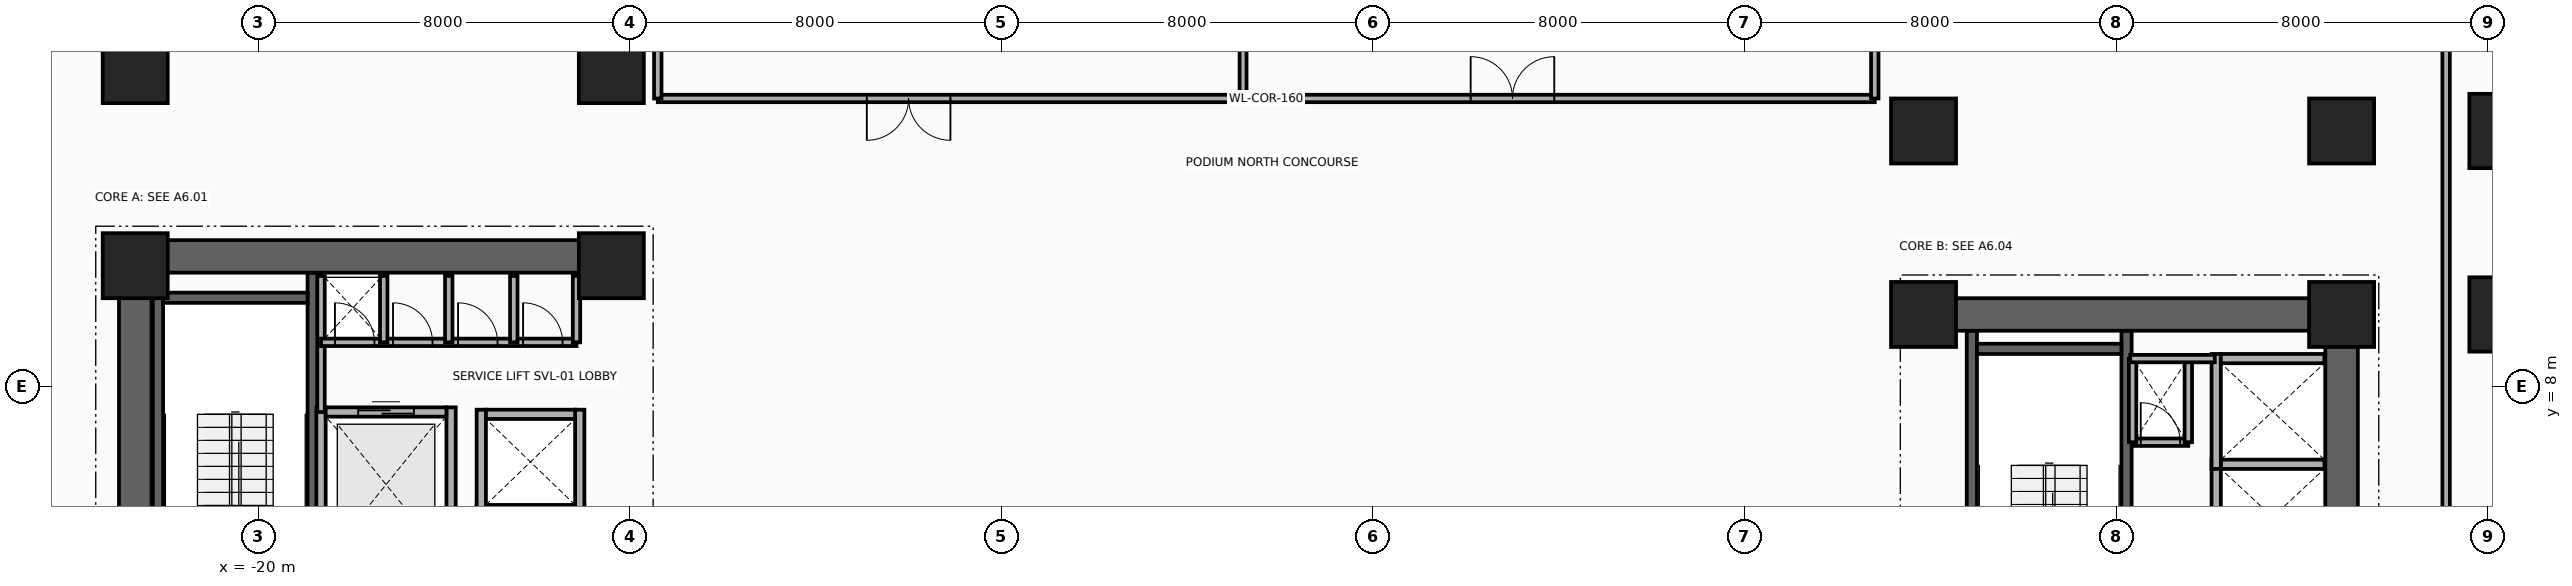
"""IFC4 building model, lengths in metres.
Left out: names, types, materials, properties, quantities, classifications, styles, units other than length and angle.
Written with IfcOpenShell. Run it as: python <this file> out.ifc"""

import sys

from ifc_helpers import new_model, si_unit, direction, frame, frame_2d, origin, origin_2d, place, context, subcontext, project, spatial, rectangle, extrude, source, transform, mapped, element, fill, save


model = new_model("IFC4")
c1 = context("Model", 3, precision=1e-05, world=origin(), true_north=direction((0.0, 1.0)))
c2 = subcontext(c1, "Body", "Model", "MODEL_VIEW")
j1 = project(units=[si_unit("LENGTHUNIT", "METRE"), si_unit("PLANEANGLEUNIT", "RADIAN")], contexts=[c1])
p1 = place(None, origin())
s1 = spatial("IfcSite", under=j1, at=p1, CompositionType="ELEMENT")
p2 = place(p1, origin())
s2 = spatial("IfcBuilding", under=s1, at=p2, CompositionType="ELEMENT")
p3 = place(p2, frame((0.0, 0.0, 15.6)))
s3 = spatial("IfcBuildingStorey", under=s2, at=p3, CompositionType="ELEMENT", Elevation=15.6)
for number, where, z_axis, x_axis in (
    (1, (-22.16, 1.78, 0.0), (0.0, 0.0, 1.0), (0.0, 1.0, 0.0)),
    (2, (-18.83, 1.78, 0.0), (0.0, 0.0, 1.0), (0.0, 1.0, 0.0)),
):
    element("IfcWall", number, at=place(p3, frame(where, z_axis=z_axis, x_axis=x_axis)), inside=s3, PredefinedType="SHEAR", context=c2, shape_type="SweptSolid", body=[
        extrude(rectangle(XDim=8.67, YDim=0.22, at=frame_2d((4.335, 0.0))), origin(), (0.0, 0.0, 1.0), 4.8),
    ])
p4 = place(p3, frame((-22.05, 9.91, 0.0), z_axis=(0.0, 0.0, 1.0), x_axis=(1.0, 0.0, 0.0)))
e3 = element("IfcWall", 3, at=p4, inside=s3, PredefinedType="SHEAR", context=c2, shape_type="SweptSolid", body=[
    extrude(rectangle(XDim=3.11, YDim=0.22, at=frame_2d((1.555, 0.0))), origin(), (0.0, 0.0, 1.0), 4.8),
])
for number, where, z_axis, x_axis in (
    (4, (16.89, 0.68, 0.0), (0.0, 0.0, 1.0), (0.0, 1.0, 0.0)),
    (5, (20.22, 0.68, 0.0), (0.0, 0.0, 1.0), (0.0, 1.0, 0.0)),
):
    element("IfcWall", number, at=place(p3, frame(where, z_axis=z_axis, x_axis=x_axis)), inside=s3, PredefinedType="SHEAR", context=c2, shape_type="SweptSolid", body=[
        extrude(rectangle(XDim=8.52, YDim=0.22, at=frame_2d((4.26, 0.0))), origin(), (0.0, 0.0, 1.0), 4.8),
    ])
p5 = place(p3, frame((17.0, 8.81, 0.0), z_axis=(0.0, 0.0, 1.0), x_axis=(1.0, 0.0, 0.0)))
e6 = element("IfcWall", 6, at=p5, inside=s3, PredefinedType="SHEAR", context=c2, shape_type="SweptSolid", body=[
    extrude(rectangle(XDim=3.11, YDim=0.22, at=frame_2d((1.555, 0.0))), origin(), (0.0, 0.0, 1.0), 4.8),
])
p6 = place(p3, frame((-22.65, -11.15, 0.0), z_axis=(0.0, 0.0, 1.0), x_axis=(0.0, 1.0, 0.0)))
e7 = element("IfcWall", 7, at=p6, inside=s3, PredefinedType="SHEAR", context=c2, shape_type="SweptSolid", body=[
    extrude(rectangle(XDim=22.3, YDim=0.7, at=frame_2d((11.15, 0.0))), origin(), (0.0, 0.0, 1.0), 4.8),
])
p7 = place(p3, frame((-22.65, 10.8, 0.0), z_axis=(0.0, 0.0, 1.0), x_axis=(1.0, 0.0, 0.0)))
e8 = element("IfcWall", 8, at=p7, inside=s3, PredefinedType="SHEAR", context=c2, shape_type="SweptSolid", body=[
    extrude(rectangle(XDim=10.25, YDim=0.7, at=frame_2d((5.125, 0.0))), origin(), (0.0, 0.0, 1.0), 4.8),
])
p8 = place(p3, frame((24.85, 0.95, 0.0), z_axis=(0.0, 0.0, 1.0), x_axis=(0.0, 1.0, 0.0)))
e9 = element("IfcWall", 9, at=p8, inside=s3, PredefinedType="SHEAR", context=c2, shape_type="SweptSolid", body=[
    extrude(rectangle(XDim=8.95, YDim=0.7, at=frame_2d((4.475, 0.0))), origin(), (0.0, 0.0, 1.0), 4.8),
])
p9 = place(p3, frame((15.85, 9.55, 0.0), z_axis=(0.0, 0.0, 1.0), x_axis=(1.0, 0.0, 0.0)))
e10 = element("IfcWall", 10, at=p9, inside=s3, PredefinedType="SHEAR", context=c2, shape_type="SweptSolid", body=[
    extrude(rectangle(XDim=9.0, YDim=0.7, at=frame_2d((4.5, 0.0))), origin(), (0.0, 0.0, 1.0), 4.8),
])
m1 = source(origin(), c2, "Body", "SweptSolid", [
    extrude(rectangle(XDim=1.4, YDim=1.4, at=origin_2d()), origin(), (0.0, 0.0, 1.0), 5.2),
])
for number, where, z_axis, x_axis in (
    (11, (-22.65, 10.6, 0.0), (0.0, 0.0, 1.0), (1.0, 0.0, 0.0)),
    (12, (-12.4, 10.6, 0.0), (0.0, 0.0, 1.0), (1.0, 0.0, 0.0)),
    (13, (-22.65, 14.8, 0.0), (0.0, 0.0, 1.0), (1.0, 0.0, 0.0)),
    (14, (-12.4, 14.8, 0.0), (0.0, 0.0, 1.0), (1.0, 0.0, 0.0)),
    (15, (15.85, 9.55, 0.0), (0.0, 0.0, 1.0), (1.0, 0.0, 0.0)),
    (16, (24.85, 9.55, 0.0), (0.0, 0.0, 1.0), (1.0, 0.0, 0.0)),
):
    element("IfcColumn", number, at=place(p3, frame(where, z_axis=z_axis, x_axis=x_axis)), inside=s3, PredefinedType="COLUMN", context=c2, shape_type="MappedRepresentation", body=[
        mapped(m1, transform((0.0, 0.0, 0.0), x_axis=(1.0, 0.0, 0.0), y_axis=(0.0, 1.0, 0.0), z_axis=(0.0, 0.0, 1.0), scale=1.0)),
    ])
m2 = source(origin(), c2, "Body", "SweptSolid", [
    extrude(rectangle(XDim=1.6, YDim=1.6, at=origin_2d()), origin(), (0.0, 0.0, 1.0), 5.2),
])
p10 = place(p3, frame((28.4, 9.55, 0.0), z_axis=(0.0, 0.0, 1.0), x_axis=(1.0, 0.0, 0.0)))
e17 = element("IfcColumn", 17, at=p10, inside=s3, PredefinedType="COLUMN", context=c2, shape_type="MappedRepresentation", body=[
    mapped(m2, transform((0.0, 0.0, 0.0), x_axis=(1.0, 0.0, 0.0), y_axis=(0.0, 1.0, 0.0), z_axis=(0.0, 0.0, 1.0), scale=1.0)),
])
for number, where, z_axis, x_axis in (
    (18, (15.85, 13.5, 0.0), (0.0, 0.0, 1.0), (1.0, 0.0, 0.0)),
    (19, (24.85, 13.5, 0.0), (0.0, 0.0, 1.0), (1.0, 0.0, 0.0)),
):
    element("IfcColumn", number, at=place(p3, frame(where, z_axis=z_axis, x_axis=x_axis)), inside=s3, PredefinedType="COLUMN", context=c2, shape_type="MappedRepresentation", body=[
        mapped(m1, transform((0.0, 0.0, 0.0), x_axis=(1.0, 0.0, 0.0), y_axis=(0.0, 1.0, 0.0), z_axis=(0.0, 0.0, 1.0), scale=1.0)),
    ])
p11 = place(p3, frame((28.4, 13.5, 0.0), z_axis=(0.0, 0.0, 1.0), x_axis=(1.0, 0.0, 0.0)))
e20 = element("IfcColumn", 20, at=p11, inside=s3, PredefinedType="COLUMN", context=c2, shape_type="MappedRepresentation", body=[
    mapped(m2, transform((0.0, 0.0, 0.0), x_axis=(1.0, 0.0, 0.0), y_axis=(0.0, 1.0, 0.0), z_axis=(0.0, 0.0, 1.0), scale=1.0)),
])
for number, where, z_axis, x_axis in (
    (21, (-18.65, 4.225, 0.0), (0.0, 0.0, 1.0), (0.0, 1.0, 0.0)),
    (22, (-15.85, 4.225, 0.0), (0.0, 0.0, 1.0), (0.0, 1.0, 0.0)),
):
    element("IfcWall", number, at=place(p3, frame(where, z_axis=z_axis, x_axis=x_axis)), inside=s3, PredefinedType="MOVABLE", context=c2, shape_type="SweptSolid", body=[
        extrude(rectangle(XDim=3.325, YDim=0.2, at=frame_2d((1.663, 0.0))), origin(), (0.0, 0.0, 1.0), 4.8),
    ])
p12 = place(p3, frame((-18.55, 7.45, 0.0), z_axis=(0.0, 0.0, 1.0), x_axis=(1.0, 0.0, 0.0)))
e23 = element("IfcWall", 23, at=p12, inside=s3, PredefinedType="MOVABLE", context=c2, shape_type="SweptSolid", body=[
    extrude(rectangle(XDim=2.6, YDim=0.2, at=frame_2d((1.3, 0.0))), origin(), (0.0, 0.0, 1.0), 4.8),
])
p13 = place(p12, frame((0.7, 0.0, 0.0)))
e24 = element("IfcOpeningElement", 24, at=p13, cuts=e23, PredefinedType="OPENING", context=c2, shape_type="SweptSolid", body=[
    extrude(rectangle(XDim=1.2, YDim=2.1, at=frame_2d((0.6, 1.05))), frame((0.0, 0.115, 0.0), z_axis=(0.0, -1.0, 0.0), x_axis=(1.0, 0.0, 0.0)), (0.0, 0.0, 1.0), 0.23),
])
p14 = place(p3, frame((22.15, 3.95, 0.0), z_axis=(0.0, 0.0, 1.0), x_axis=(0.0, 1.0, 0.0)))
e25 = element("IfcWall", 25, at=p14, inside=s3, PredefinedType="MOVABLE", context=c2, shape_type="SweptSolid", body=[
    extrude(rectangle(XDim=2.475, YDim=0.2, at=frame_2d((1.238, 0.0))), origin(), (0.0, 0.0, 1.0), 4.8),
])
p15 = place(p3, frame((22.25, 6.325, 0.0), z_axis=(0.0, 0.0, 1.0), x_axis=(1.0, 0.0, 0.0)))
e26 = element("IfcWall", 26, at=p15, inside=s3, PredefinedType="MOVABLE", context=c2, shape_type="SweptSolid", body=[
    extrude(rectangle(XDim=2.23, YDim=0.2, at=frame_2d((1.115, 0.0))), origin(), (0.0, 0.0, 1.0), 3.745),
])
p16 = place(p3, frame((22.15, 6.225, 0.0), z_axis=(0.0, 0.0, 1.0), x_axis=(0.0, 1.0, 0.0)))
e27 = element("IfcWall", 27, at=p16, inside=s3, PredefinedType="MOVABLE", context=c2, shape_type="SweptSolid", body=[
    extrude(rectangle(XDim=2.475, YDim=0.2, at=frame_2d((1.237, 0.0))), origin(), (0.0, 0.0, 1.0), 4.8),
])
p17 = place(p3, frame((22.25, 8.6, 0.0), z_axis=(0.0, 0.0, 1.0), x_axis=(1.0, 0.0, 0.0)))
e28 = element("IfcWall", 28, at=p17, inside=s3, PredefinedType="MOVABLE", context=c2, shape_type="SweptSolid", body=[
    extrude(rectangle(XDim=2.23, YDim=0.2, at=frame_2d((1.115, 0.0))), origin(), (0.0, 0.0, 1.0), 3.745),
])
for number, where, z_axis, x_axis in (
    (29, (-15.2, 3.2, 0.0), (0.0, 0.0, 1.0), (0.0, 1.0, 0.0)),
    (30, (-13.08, 3.2, 0.0), (0.0, 0.0, 1.0), (0.0, 1.0, 0.0)),
):
    element("IfcWall", number, at=place(p3, frame(where, z_axis=z_axis, x_axis=x_axis)), inside=s3, PredefinedType="MOVABLE", context=c2, shape_type="SweptSolid", body=[
        extrude(rectangle(XDim=2.25, YDim=0.2, at=frame_2d((1.125, 0.0))), origin(), (0.0, 0.0, 1.0), 4.8),
    ])
p18 = place(p3, frame((-15.1, 5.35, 0.0), z_axis=(0.0, 0.0, 1.0), x_axis=(1.0, 0.0, 0.0)))
e31 = element("IfcWall", 31, at=p18, inside=s3, PredefinedType="MOVABLE", context=c2, shape_type="SweptSolid", body=[
    extrude(rectangle(XDim=1.92, YDim=0.2, at=frame_2d((0.96, 0.0))), origin(), (0.0, 0.0, 1.0), 4.8),
])
for number, where, z_axis, x_axis in (
    (32, (-15.2, 5.25, 0.0), (0.0, 0.0, 1.0), (0.0, 1.0, 0.0)),
    (33, (-13.08, 5.25, 0.0), (0.0, 0.0, 1.0), (0.0, 1.0, 0.0)),
):
    element("IfcWall", number, at=place(p3, frame(where, z_axis=z_axis, x_axis=x_axis)), inside=s3, PredefinedType="MOVABLE", context=c2, shape_type="SweptSolid", body=[
        extrude(rectangle(XDim=2.25, YDim=0.2, at=frame_2d((1.125, 0.0))), origin(), (0.0, 0.0, 1.0), 4.8),
    ])
p19 = place(p3, frame((-15.1, 7.4, 0.0), z_axis=(0.0, 0.0, 1.0), x_axis=(1.0, 0.0, 0.0)))
e34 = element("IfcWall", 34, at=p19, inside=s3, PredefinedType="MOVABLE", context=c2, shape_type="SweptSolid", body=[
    extrude(rectangle(XDim=1.92, YDim=0.2, at=frame_2d((0.96, 0.0))), origin(), (0.0, 0.0, 1.0), 4.8),
])
p20 = place(p3, frame((-18.65, 7.45, 0.0), z_axis=(0.0, 0.0, 1.0), x_axis=(0.0, 1.0, 0.0)))
e35 = element("IfcWall", 35, at=p20, inside=s3, PredefinedType="PARTITIONING", context=c2, shape_type="SweptSolid", body=[
    extrude(rectangle(XDim=2.93, YDim=0.16, at=frame_2d((1.465, 0.0))), origin(), (0.0, 0.0, 1.0), 3.585),
])
p21 = place(p3, frame((-18.65, 8.95, 0.0), z_axis=(0.0, 0.0, 1.0), x_axis=(1.0, 0.0, 0.0)))
e36 = element("IfcWall", 36, at=p21, inside=s3, PredefinedType="PARTITIONING", context=c2, shape_type="SweptSolid", body=[
    extrude(rectangle(XDim=5.5, YDim=0.16, at=frame_2d((2.75, 0.0))), origin(), (0.0, 0.0, 1.0), 4.8),
])
p22 = place(p21, frame((0.3, 0.0, 0.0)))
e37 = element("IfcOpeningElement", 37, at=p22, cuts=e36, PredefinedType="OPENING", context=c2, shape_type="SweptSolid", body=[
    extrude(rectangle(XDim=0.85, YDim=2.05, at=frame_2d((0.425, 1.025))), frame((0.0, 0.095, 0.0), z_axis=(0.0, -1.0, 0.0), x_axis=(1.0, 0.0, 0.0)), (0.0, 0.0, 1.0), 0.19),
])
p23 = place(p21, frame((1.55, 0.0, 0.0)))
e38 = element("IfcOpeningElement", 38, at=p23, cuts=e36, PredefinedType="OPENING", context=c2, shape_type="SweptSolid", body=[
    extrude(rectangle(XDim=0.85, YDim=2.05, at=frame_2d((0.425, 1.025))), frame((0.0, 0.095, 0.0), z_axis=(0.0, -1.0, 0.0), x_axis=(1.0, 0.0, 0.0)), (0.0, 0.0, 1.0), 0.19),
])
p24 = place(p21, frame((2.95, 0.0, 0.0)))
e39 = element("IfcOpeningElement", 39, at=p24, cuts=e36, PredefinedType="OPENING", context=c2, shape_type="SweptSolid", body=[
    extrude(rectangle(XDim=0.85, YDim=2.05, at=frame_2d((0.425, 1.025))), frame((0.0, 0.095, 0.0), z_axis=(0.0, -1.0, 0.0), x_axis=(1.0, 0.0, 0.0)), (0.0, 0.0, 1.0), 0.19),
])
p25 = place(p21, frame((4.35, 0.0, 0.0)))
e40 = element("IfcOpeningElement", 40, at=p25, cuts=e36, PredefinedType="OPENING", context=c2, shape_type="SweptSolid", body=[
    extrude(rectangle(XDim=0.85, YDim=2.05, at=frame_2d((0.425, 1.025))), frame((0.0, 0.095, 0.0), z_axis=(0.0, -1.0, 0.0), x_axis=(1.0, 0.0, 0.0)), (0.0, 0.0, 1.0), 0.19),
])
for number, where, z_axis, x_axis in (
    (41, (-13.15, 8.95, 0.0), (0.0, 0.0, 1.0), (0.0, 1.0, 0.0)),
    (42, (-17.3, 8.95, 0.0), (0.0, 0.0, 1.0), (0.0, 1.0, 0.0)),
    (43, (-15.9, 8.95, 0.0), (0.0, 0.0, 1.0), (0.0, 1.0, 0.0)),
    (44, (-14.5, 8.95, 0.0), (0.0, 0.0, 1.0), (0.0, 1.0, 0.0)),
):
    element("IfcWall", number, at=place(p3, frame(where, z_axis=z_axis, x_axis=x_axis)), inside=s3, PredefinedType="PARTITIONING", context=c2, shape_type="SweptSolid", body=[
        extrude(rectangle(XDim=1.43, YDim=0.16, at=frame_2d((0.715, 0.0))), origin(), (0.0, 0.0, 1.0), 3.585),
    ])
p26 = place(p3, frame((20.35, 6.8, 0.0), z_axis=(0.0, 0.0, 1.0), x_axis=(1.0, 0.0, 0.0)))
e45 = element("IfcWall", 45, at=p26, inside=s3, PredefinedType="PARTITIONING", context=c2, shape_type="SweptSolid", body=[
    extrude(rectangle(XDim=1.2, YDim=0.16, at=frame_2d((0.6, 0.0))), origin(), (0.0, 0.0, 1.0), 4.8),
])
p27 = place(p26, frame((0.175, 0.0, 0.0)))
e46 = element("IfcOpeningElement", 46, at=p27, cuts=e45, PredefinedType="OPENING", context=c2, shape_type="SweptSolid", body=[
    extrude(rectangle(XDim=0.85, YDim=2.05, at=frame_2d((0.425, 1.025))), frame((0.0, 0.095, 0.0), z_axis=(0.0, -1.0, 0.0), x_axis=(1.0, 0.0, 0.0)), (0.0, 0.0, 1.0), 0.19),
])
for number, where, z_axis, x_axis in (
    (47, (21.55, 6.8, 0.0), (0.0, 0.0, 1.0), (0.0, 1.0, 0.0)),
    (48, (20.35, 6.8, 0.0), (0.0, 0.0, 1.0), (0.0, 1.0, 0.0)),
):
    element("IfcWall", number, at=place(p3, frame(where, z_axis=z_axis, x_axis=x_axis)), inside=s3, PredefinedType="PARTITIONING", context=c2, shape_type="SweptSolid", body=[
        extrude(rectangle(XDim=1.8, YDim=0.16, at=frame_2d((0.9, 0.0))), origin(), (0.0, 0.0, 1.0), 4.8),
    ])
p28 = place(p3, frame((20.3, 8.6, 0.0), z_axis=(0.0, 0.0, 1.0), x_axis=(1.0, 0.0, 0.0)))
e49 = element("IfcWall", 49, at=p28, inside=s3, PredefinedType="PARTITIONING", context=c2, shape_type="SweptSolid", body=[
    extrude(rectangle(XDim=1.82, YDim=0.16, at=frame_2d((0.91, 0.0))), origin(), (0.0, 0.0, 1.0), 4.8),
])
p29 = place(p3, frame((-11.4, 14.2, 0.0), z_axis=(0.0, 0.0, 1.0), x_axis=(1.0, 0.0, 0.0)))
e50 = element("IfcWall", 50, at=p29, inside=s3, PredefinedType="PARTITIONING", context=c2, shape_type="SweptSolid", body=[
    extrude(rectangle(XDim=26.2, YDim=0.16, at=frame_2d((13.1, 0.0))), origin(), (0.0, 0.0, 1.0), 3.285),
])
p30 = place(p29, frame((4.5, 0.0, 0.0)))
e51 = element("IfcOpeningElement", 51, at=p30, cuts=e50, PredefinedType="OPENING", context=c2, shape_type="SweptSolid", body=[
    extrude(rectangle(XDim=1.8, YDim=2.15, at=frame_2d((0.9, 1.075))), frame((0.0, 0.095, 0.0), z_axis=(0.0, -1.0, 0.0), x_axis=(1.0, 0.0, 0.0)), (0.0, 0.0, 1.0), 0.19),
])
p31 = place(p29, frame((17.5, 0.0, 0.0)))
e52 = element("IfcOpeningElement", 52, at=p31, cuts=e50, PredefinedType="OPENING", context=c2, shape_type="SweptSolid", body=[
    extrude(rectangle(XDim=1.8, YDim=2.15, at=frame_2d((0.9, 1.075))), frame((0.0, 0.095, 0.0), z_axis=(0.0, -1.0, 0.0), x_axis=(1.0, 0.0, 0.0)), (0.0, 0.0, 1.0), 0.19),
])
p32 = place(p3, frame((-11.4, 14.2, 0.0), z_axis=(0.0, 0.0, 1.0), x_axis=(0.0, 1.0, 0.0)))
e53 = element("IfcWall", 53, at=p32, inside=s3, PredefinedType="PARTITIONING", context=c2, shape_type="SweptSolid", body=[
    extrude(rectangle(XDim=8.54, YDim=0.16, at=frame_2d((4.27, 0.0))), origin(), (0.0, 0.0, 1.0), 3.285),
])
p33 = place(p3, frame((14.8, 14.2, 0.0), z_axis=(0.0, 0.0, 1.0), x_axis=(0.0, 1.0, 0.0)))
e54 = element("IfcWall", 54, at=p33, inside=s3, PredefinedType="PARTITIONING", context=c2, shape_type="SweptSolid", body=[
    extrude(rectangle(XDim=8.54, YDim=0.16, at=frame_2d((4.27, 0.0))), origin(), (0.0, 0.0, 1.0), 3.837),
])
p34 = place(p3, frame((1.2, 14.2, 0.0), z_axis=(0.0, 0.0, 1.0), x_axis=(0.0, 1.0, 0.0)))
e55 = element("IfcWall", 55, at=p34, inside=s3, PredefinedType="PARTITIONING", context=c2, shape_type="SweptSolid", body=[
    extrude(rectangle(XDim=8.54, YDim=0.15, at=frame_2d((4.27, 0.0))), origin(), (0.0, 0.0, 1.0), 3.285),
])
p35 = place(p3, frame((27.1, -22.74, 0.0), z_axis=(0.0, 0.0, 1.0), x_axis=(0.0, 1.0, 0.0)))
e56 = element("IfcWall", 56, at=p35, inside=s3, PredefinedType="PARTITIONING", context=c2, shape_type="SweptSolid", body=[
    extrude(rectangle(XDim=45.48, YDim=0.16, at=frame_2d((22.74, 0.0))), origin(), (0.0, 0.0, 1.0), 3.585),
])
p36 = place(p35, frame((7.0, 0.0, 0.0)))
e57 = element("IfcOpeningElement", 57, at=p36, cuts=e56, PredefinedType="OPENING", context=c2, shape_type="SweptSolid", body=[
    extrude(rectangle(XDim=1.8, YDim=2.15, at=frame_2d((0.9, 1.075))), frame((0.0, 0.095, 0.0), z_axis=(0.0, -1.0, 0.0), x_axis=(1.0, 0.0, 0.0)), (0.0, 0.0, 1.0), 0.19),
])
p37 = place(p35, frame((25.0, 0.0, 0.0)))
e58 = element("IfcOpeningElement", 58, at=p37, cuts=e56, PredefinedType="OPENING", context=c2, shape_type="SweptSolid", body=[
    extrude(rectangle(XDim=1.8, YDim=2.15, at=frame_2d((0.9, 1.075))), frame((0.0, 0.095, 0.0), z_axis=(0.0, -1.0, 0.0), x_axis=(1.0, 0.0, 0.0)), (0.0, 0.0, 1.0), 0.19),
])
p38 = place(p13, origin())
e59 = element("IfcDoor", 59, at=p38, inside=s3, OperationType="DOUBLE_DOOR_SLIDING", PredefinedType="DOOR", context=c2, shape_type="SweptSolid", body=[
    extrude(rectangle(XDim=1.2, YDim=2.1, at=frame_2d((0.6, 1.05))), frame((0.0, 0.025, 0.0), z_axis=(0.0, -1.0, 0.0), x_axis=(1.0, 0.0, 0.0)), (0.0, 0.0, 1.0), 0.05),
])
fill(e24, e59)
p39 = place(p22, origin())
e60 = element("IfcDoor", 60, at=p39, inside=s3, OperationType="SINGLE_SWING_LEFT", PredefinedType="DOOR", context=c2, shape_type="SweptSolid", body=[
    extrude(rectangle(XDim=0.85, YDim=2.05, at=frame_2d((0.425, 1.025))), frame((0.0, 0.025, 0.0), z_axis=(0.0, -1.0, 0.0), x_axis=(1.0, 0.0, 0.0)), (0.0, 0.0, 1.0), 0.05),
])
fill(e37, e60)
p40 = place(p23, origin())
e61 = element("IfcDoor", 61, at=p40, inside=s3, OperationType="SINGLE_SWING_RIGHT", PredefinedType="DOOR", context=c2, shape_type="SweptSolid", body=[
    extrude(rectangle(XDim=0.85, YDim=2.05, at=frame_2d((0.425, 1.025))), frame((0.0, 0.025, 0.0), z_axis=(0.0, -1.0, 0.0), x_axis=(1.0, 0.0, 0.0)), (0.0, 0.0, 1.0), 0.05),
])
fill(e38, e61)
p41 = place(p24, origin())
e62 = element("IfcDoor", 62, at=p41, inside=s3, OperationType="SINGLE_SWING_LEFT", PredefinedType="DOOR", context=c2, shape_type="SweptSolid", body=[
    extrude(rectangle(XDim=0.85, YDim=2.05, at=frame_2d((0.425, 1.025))), frame((0.0, 0.025, 0.0), z_axis=(0.0, -1.0, 0.0), x_axis=(1.0, 0.0, 0.0)), (0.0, 0.0, 1.0), 0.05),
])
fill(e39, e62)
p42 = place(p25, origin())
e63 = element("IfcDoor", 63, at=p42, inside=s3, OperationType="SINGLE_SWING_RIGHT", PredefinedType="DOOR", context=c2, shape_type="SweptSolid", body=[
    extrude(rectangle(XDim=0.85, YDim=2.05, at=frame_2d((0.425, 1.025))), frame((0.0, 0.025, 0.0), z_axis=(0.0, -1.0, 0.0), x_axis=(1.0, 0.0, 0.0)), (0.0, 0.0, 1.0), 0.05),
])
fill(e40, e63)
p43 = place(p27, origin())
e64 = element("IfcDoor", 64, at=p43, inside=s3, OperationType="SINGLE_SWING_RIGHT", PredefinedType="DOOR", context=c2, shape_type="SweptSolid", body=[
    extrude(rectangle(XDim=0.85, YDim=2.05, at=frame_2d((0.425, 1.025))), frame((0.0, 0.025, 0.0), z_axis=(0.0, -1.0, 0.0), x_axis=(1.0, 0.0, 0.0)), (0.0, 0.0, 1.0), 0.05),
])
fill(e46, e64)
p44 = place(p30, frame((1.8, 0.0, 0.0), z_axis=(0.0, 0.0, 1.0), x_axis=(-1.0, 0.0, 0.0)))
e65 = element("IfcDoor", 65, at=p44, inside=s3, OperationType="DOUBLE_DOOR_SINGLE_SWING", PredefinedType="DOOR", context=c2, shape_type="SweptSolid", body=[
    extrude(rectangle(XDim=1.8, YDim=2.15, at=frame_2d((0.9, 1.075))), frame((0.0, 0.025, 0.0), z_axis=(0.0, -1.0, 0.0), x_axis=(1.0, 0.0, 0.0)), (0.0, 0.0, 1.0), 0.05),
])
fill(e51, e65)
p45 = place(p31, origin())
e66 = element("IfcDoor", 66, at=p45, inside=s3, OperationType="DOUBLE_DOOR_SINGLE_SWING", PredefinedType="DOOR", context=c2, shape_type="SweptSolid", body=[
    extrude(rectangle(XDim=1.8, YDim=2.15, at=frame_2d((0.9, 1.075))), frame((0.0, 0.025, 0.0), z_axis=(0.0, -1.0, 0.0), x_axis=(1.0, 0.0, 0.0)), (0.0, 0.0, 1.0), 0.05),
])
fill(e52, e66)
save(model, sys.argv[1])
